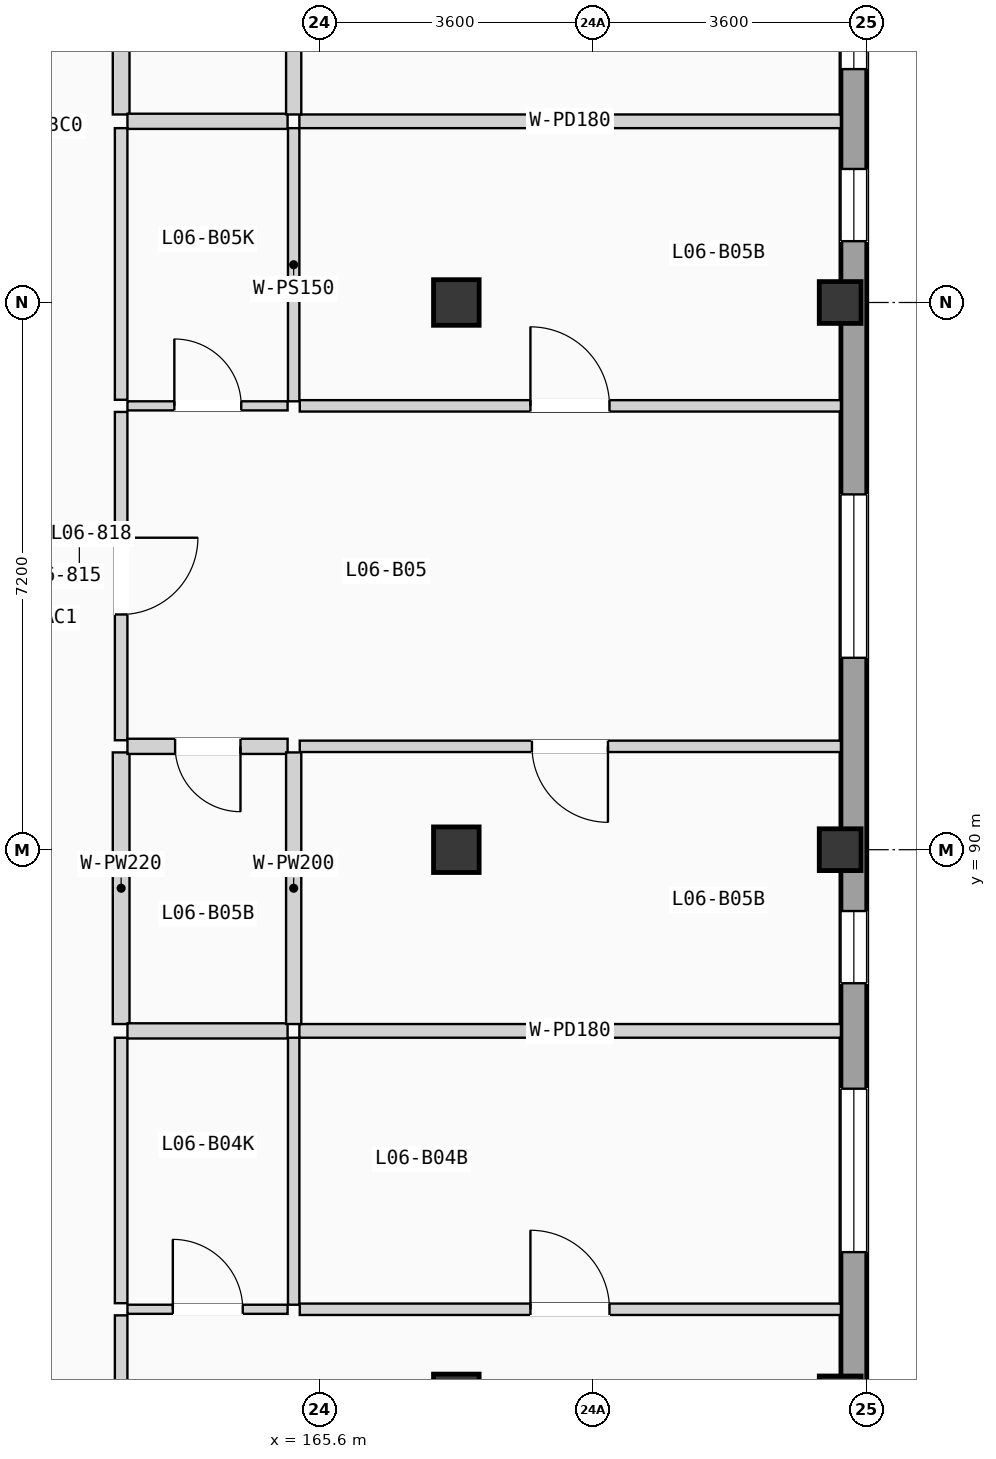
"""IFC4 building model, lengths in metres.
Left out: names, types, materials, properties, quantities, classifications, styles, units other than length and angle.
Written with IfcOpenShell. Run it as: python <this file> out.ifc"""

import sys

from ifc_helpers import new_model, si_unit, direction, frame, frame_2d, origin, origin_2d, place, context, subcontext, project, spatial, rectangle, extrude, element, fill, save


model = new_model("IFC4")
c1 = context("Model", 3, precision=1e-05, world=origin(), true_north=direction((0.0, 1.0)))
c2 = subcontext(c1, "Body", "Model", "MODEL_VIEW")
j1 = project(units=[si_unit("LENGTHUNIT", "METRE"), si_unit("PLANEANGLEUNIT", "RADIAN")], contexts=[c1])
p1 = place(None, origin())
s1 = spatial("IfcSite", under=j1, at=p1, CompositionType="ELEMENT")
p2 = place(p1, origin())
s2 = spatial("IfcBuilding", under=s1, at=p2, CompositionType="ELEMENT")
p3 = place(p2, frame((0.0, 0.0, 21.525)))
s3 = spatial("IfcBuildingStorey", under=s2, at=p3, CompositionType="ELEMENT", Elevation=21.525)
for number, where, z_axis, x_axis in (
    (1, (167.4, 82.8, 0.0), (0.0, 0.0, 1.0), (1.0, 0.0, 0.0)),
    (2, (167.4, 90.0, 0.0), (0.0, 0.0, 1.0), (1.0, 0.0, 0.0)),
    (3, (167.4, 97.2, 0.0), (0.0, 0.0, 1.0), (1.0, 0.0, 0.0)),
):
    element("IfcColumn", number, at=place(p3, frame(where, z_axis=z_axis, x_axis=x_axis)), inside=s3, PredefinedType="COLUMN", context=c2, shape_type="SweptSolid", body=[
        extrude(rectangle(XDim=0.6, YDim=0.6, at=origin_2d()), origin(), (0.0, 0.0, 1.0), 3.15),
    ])
for number, where, z_axis, x_axis in (
    (4, (172.45, 82.8, 0.0), (0.0, 0.0, 1.0), (1.0, 0.0, 0.0)),
    (5, (172.45, 90.0, 0.0), (0.0, 0.0, 1.0), (1.0, 0.0, 0.0)),
    (6, (172.45, 97.2, 0.0), (0.0, 0.0, 1.0), (1.0, 0.0, 0.0)),
):
    element("IfcColumn", number, at=place(p3, frame(where, z_axis=z_axis, x_axis=x_axis)), inside=s3, PredefinedType="COLUMN", context=c2, shape_type="SweptSolid", body=[
        extrude(rectangle(XDim=0.55, YDim=0.55, at=origin_2d()), origin(), (0.0, 0.0, 1.0), 3.15),
    ])
p4 = place(p3, frame((172.63, 68.74, 0.0), z_axis=(0.0, 0.0, 1.0), x_axis=(0.0, 1.0, 0.0)))
e7 = element("IfcWall", 7, at=p4, inside=s3, PredefinedType="SOLIDWALL", context=c2, shape_type="SweptSolid", body=[
    extrude(rectangle(XDim=49.72, YDim=0.34, at=frame_2d((24.86, 0.0))), origin(), (0.0, 0.0, 1.0), 2.89),
])
p5 = place(p4, frame((11.276, 0.0, 0.9)))
e8 = element("IfcOpeningElement", 8, at=p5, cuts=e7, PredefinedType="OPENING", context=c2, shape_type="SweptSolid", body=[
    extrude(rectangle(XDim=2.15, YDim=1.2, at=frame_2d((1.075, 0.6))), frame((0.0, 0.18, 0.0), z_axis=(0.0, -1.0, 0.0), x_axis=(1.0, 0.0, 0.0)), (0.0, 0.0, 1.0), 0.36),
])
p6 = place(p4, frame((7.931, 0.0, 0.855)))
e9 = element("IfcOpeningElement", 9, at=p6, cuts=e7, PredefinedType="OPENING", context=c2, shape_type="SweptSolid", body=[
    extrude(rectangle(XDim=2.15, YDim=1.35, at=frame_2d((1.075, 0.675))), frame((0.0, 0.18, 0.0), z_axis=(0.0, -1.0, 0.0), x_axis=(1.0, 0.0, 0.0)), (0.0, 0.0, 1.0), 0.36),
])
p7 = place(p4, frame((15.965, 0.0, 0.705)))
e10 = element("IfcOpeningElement", 10, at=p7, cuts=e7, PredefinedType="OPENING", context=c2, shape_type="SweptSolid", body=[
    extrude(rectangle(XDim=2.15, YDim=1.5, at=frame_2d((1.075, 0.75))), frame((0.0, 0.18, 0.0), z_axis=(0.0, -1.0, 0.0), x_axis=(1.0, 0.0, 0.0)), (0.0, 0.0, 1.0), 0.36),
])
p8 = place(p4, frame((23.785, 0.0, 0.555)))
e11 = element("IfcOpeningElement", 11, at=p8, cuts=e7, PredefinedType="OPENING", context=c2, shape_type="SweptSolid", body=[
    extrude(rectangle(XDim=2.15, YDim=1.65, at=frame_2d((1.075, 0.825))), frame((0.0, 0.18, 0.0), z_axis=(0.0, -1.0, 0.0), x_axis=(1.0, 0.0, 0.0)), (0.0, 0.0, 1.0), 0.36),
])
p9 = place(p4, frame((19.503, 0.0, 0.85)))
e12 = element("IfcOpeningElement", 12, at=p9, cuts=e7, PredefinedType="OPENING", context=c2, shape_type="SweptSolid", body=[
    extrude(rectangle(XDim=0.95, YDim=1.2, at=frame_2d((0.475, 0.6))), frame((0.0, 0.18, 0.0), z_axis=(0.0, -1.0, 0.0), x_axis=(1.0, 0.0, 0.0)), (0.0, 0.0, 1.0), 0.36),
])
p10 = place(p4, frame((29.267, 0.0, 0.85)))
e13 = element("IfcOpeningElement", 13, at=p10, cuts=e7, PredefinedType="OPENING", context=c2, shape_type="SweptSolid", body=[
    extrude(rectangle(XDim=0.95, YDim=1.2, at=frame_2d((0.475, 0.6))), frame((0.0, 0.18, 0.0), z_axis=(0.0, -1.0, 0.0), x_axis=(1.0, 0.0, 0.0)), (0.0, 0.0, 1.0), 0.36),
])
p11 = place(p4, frame((36.218, 0.0, 0.855)))
e14 = element("IfcOpeningElement", 14, at=p11, cuts=e7, PredefinedType="OPENING", context=c2, shape_type="SweptSolid", body=[
    extrude(rectangle(XDim=2.3, YDim=1.35, at=frame_2d((1.15, 0.675))), frame((0.0, 0.18, 0.0), z_axis=(0.0, -1.0, 0.0), x_axis=(1.0, 0.0, 0.0)), (0.0, 0.0, 1.0), 0.36),
])
p12 = place(p4, frame((31.531, 0.0, 0.705)))
e15 = element("IfcOpeningElement", 15, at=p12, cuts=e7, PredefinedType="OPENING", context=c2, shape_type="SweptSolid", body=[
    extrude(rectangle(XDim=2.3, YDim=1.5, at=frame_2d((1.15, 0.75))), frame((0.0, 0.18, 0.0), z_axis=(0.0, -1.0, 0.0), x_axis=(1.0, 0.0, 0.0)), (0.0, 0.0, 1.0), 0.36),
])
p13 = place(p4, frame((39.563, 0.0, 0.555)))
e16 = element("IfcOpeningElement", 16, at=p13, cuts=e7, PredefinedType="OPENING", context=c2, shape_type="SweptSolid", body=[
    extrude(rectangle(XDim=2.3, YDim=1.65, at=frame_2d((1.15, 0.825))), frame((0.0, 0.18, 0.0), z_axis=(0.0, -1.0, 0.0), x_axis=(1.0, 0.0, 0.0)), (0.0, 0.0, 1.0), 0.36),
])
p14 = place(p3, frame((162.99, 79.653, 0.0), z_axis=(0.0, 0.0, 1.0), x_axis=(0.0, 1.0, 0.0)))
e17 = element("IfcWall", 17, at=p14, inside=s3, PredefinedType="PARTITIONING", context=c2, shape_type="SweptSolid", body=[
    extrude(rectangle(XDim=4.22, YDim=0.165, at=frame_2d((2.11, 0.0))), origin(), (0.0, 0.0, 1.0), 2.87),
])
p15 = place(p14, frame((1.605, 0.0, 0.0)))
e18 = element("IfcOpeningElement", 18, at=p15, cuts=e17, PredefinedType="OPENING", context=c2, shape_type="SweptSolid", body=[
    extrude(rectangle(XDim=1.01, YDim=2.11, at=frame_2d((0.505, 1.055))), frame((0.0, 0.093, 0.0), z_axis=(0.0, -1.0, 0.0), x_axis=(1.0, 0.0, 0.0)), (0.0, 0.0, 1.0), 0.185),
])
p16 = place(p3, frame((162.99, 84.033, 0.0), z_axis=(0.0, 0.0, 1.0), x_axis=(0.0, 1.0, 0.0)))
e19 = element("IfcWall", 19, at=p16, inside=s3, PredefinedType="PARTITIONING", context=c2, shape_type="SweptSolid", body=[
    extrude(rectangle(XDim=3.493, YDim=0.165, at=frame_2d((1.747, 0.0))), origin(), (0.0, 0.0, 1.0), 2.87),
])
p17 = place(p3, frame((162.99, 91.44, 0.0), z_axis=(0.0, 0.0, 1.0), x_axis=(0.0, 1.0, 0.0)))
e20 = element("IfcWall", 20, at=p17, inside=s3, PredefinedType="PARTITIONING", context=c2, shape_type="SweptSolid", body=[
    extrude(rectangle(XDim=4.32, YDim=0.165, at=frame_2d((2.16, 0.0))), origin(), (0.0, 0.0, 1.0), 2.87),
])
p18 = place(p17, frame((1.655, 0.0, 0.0)))
e21 = element("IfcOpeningElement", 21, at=p18, cuts=e20, PredefinedType="OPENING", context=c2, shape_type="SweptSolid", body=[
    extrude(rectangle(XDim=1.01, YDim=2.11, at=frame_2d((0.505, 1.055))), frame((0.0, 0.093, 0.0), z_axis=(0.0, -1.0, 0.0), x_axis=(1.0, 0.0, 0.0)), (0.0, 0.0, 1.0), 0.185),
])
p19 = place(p3, frame((162.99, 87.706, 0.0), z_axis=(0.0, 0.0, 1.0), x_axis=(0.0, 1.0, 0.0)))
e22 = element("IfcWall", 22, at=p19, inside=s3, PredefinedType="PLUMBINGWALL", context=c2, shape_type="SweptSolid", body=[
    extrude(rectangle(XDim=3.574, YDim=0.22, at=frame_2d((1.787, 0.0))), origin(), (0.0, 0.0, 1.0), 2.87),
])
p20 = place(p3, frame((162.99, 95.92, 0.0), z_axis=(0.0, 0.0, 1.0), x_axis=(0.0, 1.0, 0.0)))
e23 = element("IfcWall", 23, at=p20, inside=s3, PredefinedType="PARTITIONING", context=c2, shape_type="SweptSolid", body=[
    extrude(rectangle(XDim=3.574, YDim=0.165, at=frame_2d((1.787, 0.0))), origin(), (0.0, 0.0, 1.0), 2.87),
])
p21 = place(p3, frame((162.99, 99.674, 0.0), z_axis=(0.0, 0.0, 1.0), x_axis=(0.0, 1.0, 0.0)))
e24 = element("IfcWall", 24, at=p21, inside=s3, PredefinedType="PLUMBINGWALL", context=c2, shape_type="SweptSolid", body=[
    extrude(rectangle(XDim=3.493, YDim=0.22, at=frame_2d((1.747, 0.0))), origin(), (0.0, 0.0, 1.0), 2.87),
])
p22 = place(p3, frame((163.073, 83.953, 0.0), z_axis=(0.0, 0.0, 1.0), x_axis=(1.0, 0.0, 0.0)))
e25 = element("IfcWall", 25, at=p22, inside=s3, PredefinedType="PARTITIONING", context=c2, shape_type="SweptSolid", body=[
    extrude(rectangle(XDim=2.107, YDim=0.12, at=frame_2d((1.053, 0.0))), origin(), (0.0, 0.0, 1.0), 2.87),
])
p23 = place(p22, frame((0.597, 0.0, 0.0)))
e26 = element("IfcOpeningElement", 26, at=p23, cuts=e25, PredefinedType="OPENING", context=c2, shape_type="SweptSolid", body=[
    extrude(rectangle(XDim=0.92, YDim=2.02, at=frame_2d((0.46, 1.01))), frame((0.0, 0.07, 0.0), z_axis=(0.0, -1.0, 0.0), x_axis=(1.0, 0.0, 0.0)), (0.0, 0.0, 1.0), 0.14),
])
p24 = place(p3, frame((165.34, 83.953, 0.0), z_axis=(0.0, 0.0, 1.0), x_axis=(1.0, 0.0, 0.0)))
e27 = element("IfcWall", 27, at=p24, inside=s3, PredefinedType="PARTITIONING", context=c2, shape_type="SweptSolid", body=[
    extrude(rectangle(XDim=7.12, YDim=0.15, at=frame_2d((3.56, 0.0))), origin(), (0.0, 0.0, 1.0), 2.87),
])
p25 = place(p24, frame((3.035, 0.0, 0.0)))
e28 = element("IfcOpeningElement", 28, at=p25, cuts=e27, PredefinedType="OPENING", context=c2, shape_type="SweptSolid", body=[
    extrude(rectangle(XDim=1.04, YDim=2.08, at=frame_2d((0.52, 1.04))), frame((0.0, 0.085, 0.0), z_axis=(0.0, -1.0, 0.0), x_axis=(1.0, 0.0, 0.0)), (0.0, 0.0, 1.0), 0.17),
])
p26 = place(p3, frame((165.26, 84.013, 0.0), z_axis=(0.0, 0.0, 1.0), x_axis=(0.0, 1.0, 0.0)))
e29 = element("IfcWall", 29, at=p26, inside=s3, PredefinedType="PARTITIONING", context=c2, shape_type="SweptSolid", body=[
    extrude(rectangle(XDim=3.513, YDim=0.15, at=frame_2d((1.756, 0.0))), origin(), (0.0, 0.0, 1.0), 2.87),
])
p27 = place(p3, frame((163.073, 87.616, 0.0), z_axis=(0.0, 0.0, 1.0), x_axis=(1.0, 0.0, 0.0)))
e30 = element("IfcWall", 30, at=p27, inside=s3, PredefinedType="PLUMBINGWALL", context=c2, shape_type="SweptSolid", body=[
    extrude(rectangle(XDim=2.107, YDim=0.2, at=frame_2d((1.053, 0.0))), origin(), (0.0, 0.0, 1.0), 2.87),
])
p28 = place(p3, frame((165.335, 87.616, 0.0), z_axis=(0.0, 0.0, 1.0), x_axis=(1.0, 0.0, 0.0)))
e31 = element("IfcWall", 31, at=p28, inside=s3, PredefinedType="PARTITIONING", context=c2, shape_type="SweptSolid", body=[
    extrude(rectangle(XDim=7.125, YDim=0.18, at=frame_2d((3.562, 0.0))), origin(), (0.0, 0.0, 1.0), 2.87),
])
p29 = place(p3, frame((163.073, 91.36, 0.0), z_axis=(0.0, 0.0, 1.0), x_axis=(1.0, 0.0, 0.0)))
e32 = element("IfcWall", 32, at=p29, inside=s3, PredefinedType="PLUMBINGWALL", context=c2, shape_type="SweptSolid", body=[
    extrude(rectangle(XDim=2.107, YDim=0.2, at=frame_2d((1.053, 0.0))), origin(), (0.0, 0.0, 1.0), 2.87),
])
p30 = place(p29, frame((0.627, 0.0, 0.0)))
e33 = element("IfcOpeningElement", 33, at=p30, cuts=e32, PredefinedType="OPENING", context=c2, shape_type="SweptSolid", body=[
    extrude(rectangle(XDim=0.86, YDim=2.0, at=frame_2d((0.43, 1.0))), frame((0.0, 0.11, 0.0), z_axis=(0.0, -1.0, 0.0), x_axis=(1.0, 0.0, 0.0)), (0.0, 0.0, 1.0), 0.22),
])
p31 = place(p3, frame((163.073, 95.84, 0.0), z_axis=(0.0, 0.0, 1.0), x_axis=(1.0, 0.0, 0.0)))
e34 = element("IfcWall", 34, at=p31, inside=s3, PredefinedType="PARTITIONING", context=c2, shape_type="SweptSolid", body=[
    extrude(rectangle(XDim=2.107, YDim=0.12, at=frame_2d((1.053, 0.0))), origin(), (0.0, 0.0, 1.0), 2.87),
])
p32 = place(p31, frame((0.617, 0.0, 0.0)))
e35 = element("IfcOpeningElement", 35, at=p32, cuts=e34, PredefinedType="OPENING", context=c2, shape_type="SweptSolid", body=[
    extrude(rectangle(XDim=0.88, YDim=2.02, at=frame_2d((0.44, 1.01))), frame((0.0, 0.07, 0.0), z_axis=(0.0, -1.0, 0.0), x_axis=(1.0, 0.0, 0.0)), (0.0, 0.0, 1.0), 0.14),
])
p33 = place(p3, frame((165.34, 91.36, 0.0), z_axis=(0.0, 0.0, 1.0), x_axis=(1.0, 0.0, 0.0)))
e36 = element("IfcWall", 36, at=p33, inside=s3, PredefinedType="PARTITIONING", context=c2, shape_type="SweptSolid", body=[
    extrude(rectangle(XDim=7.12, YDim=0.15, at=frame_2d((3.56, 0.0))), origin(), (0.0, 0.0, 1.0), 2.87),
])
p34 = place(p33, frame((3.055, 0.0, 0.0)))
e37 = element("IfcOpeningElement", 37, at=p34, cuts=e36, PredefinedType="OPENING", context=c2, shape_type="SweptSolid", body=[
    extrude(rectangle(XDim=1.0, YDim=2.06, at=frame_2d((0.5, 1.03))), frame((0.0, 0.085, 0.0), z_axis=(0.0, -1.0, 0.0), x_axis=(1.0, 0.0, 0.0)), (0.0, 0.0, 1.0), 0.17),
])
p35 = place(p3, frame((165.34, 95.84, 0.0), z_axis=(0.0, 0.0, 1.0), x_axis=(1.0, 0.0, 0.0)))
e38 = element("IfcWall", 38, at=p35, inside=s3, PredefinedType="PARTITIONING", context=c2, shape_type="SweptSolid", body=[
    extrude(rectangle(XDim=7.12, YDim=0.15, at=frame_2d((3.56, 0.0))), origin(), (0.0, 0.0, 1.0), 2.87),
])
p36 = place(p35, frame((3.035, 0.0, 0.0)))
e39 = element("IfcOpeningElement", 39, at=p36, cuts=e38, PredefinedType="OPENING", context=c2, shape_type="SweptSolid", body=[
    extrude(rectangle(XDim=1.04, YDim=2.08, at=frame_2d((0.52, 1.04))), frame((0.0, 0.085, 0.0), z_axis=(0.0, -1.0, 0.0), x_axis=(1.0, 0.0, 0.0)), (0.0, 0.0, 1.0), 0.17),
])
p37 = place(p3, frame((165.26, 87.706, 0.0), z_axis=(0.0, 0.0, 1.0), x_axis=(0.0, 1.0, 0.0)))
e40 = element("IfcWall", 40, at=p37, inside=s3, PredefinedType="PLUMBINGWALL", context=c2, shape_type="SweptSolid", body=[
    extrude(rectangle(XDim=3.574, YDim=0.2, at=frame_2d((1.787, 0.0))), origin(), (0.0, 0.0, 1.0), 2.87),
])
p38 = place(p3, frame((165.26, 95.9, 0.0), z_axis=(0.0, 0.0, 1.0), x_axis=(0.0, 1.0, 0.0)))
e41 = element("IfcWall", 41, at=p38, inside=s3, PredefinedType="PARTITIONING", context=c2, shape_type="SweptSolid", body=[
    extrude(rectangle(XDim=3.594, YDim=0.15, at=frame_2d((1.797, 0.0))), origin(), (0.0, 0.0, 1.0), 2.87),
])
p39 = place(p3, frame((163.073, 99.584, 0.0), z_axis=(0.0, 0.0, 1.0), x_axis=(1.0, 0.0, 0.0)))
e42 = element("IfcWall", 42, at=p39, inside=s3, PredefinedType="PLUMBINGWALL", context=c2, shape_type="SweptSolid", body=[
    extrude(rectangle(XDim=2.107, YDim=0.2, at=frame_2d((1.053, 0.0))), origin(), (0.0, 0.0, 1.0), 2.87),
])
p40 = place(p3, frame((165.335, 99.584, 0.0), z_axis=(0.0, 0.0, 1.0), x_axis=(1.0, 0.0, 0.0)))
e43 = element("IfcWall", 43, at=p40, inside=s3, PredefinedType="PARTITIONING", context=c2, shape_type="SweptSolid", body=[
    extrude(rectangle(XDim=7.125, YDim=0.18, at=frame_2d((3.562, 0.0))), origin(), (0.0, 0.0, 1.0), 2.87),
])
p41 = place(p3, frame((165.26, 99.674, 0.0), z_axis=(0.0, 0.0, 1.0), x_axis=(0.0, 1.0, 0.0)))
e44 = element("IfcWall", 44, at=p41, inside=s3, PredefinedType="PLUMBINGWALL", context=c2, shape_type="SweptSolid", body=[
    extrude(rectangle(XDim=3.493, YDim=0.2, at=frame_2d((1.747, 0.0))), origin(), (0.0, 0.0, 1.0), 2.87),
])
p42 = place(p7, origin())
e45 = element("IfcWindow", 45, at=p42, inside=s3, PartitioningType="DOUBLE_PANEL_VERTICAL", PredefinedType="WINDOW", context=c2, shape_type="SweptSolid", body=[
    extrude(rectangle(XDim=2.15, YDim=1.5, at=frame_2d((1.075, 0.75))), frame((0.0, 0.03, 0.0), z_axis=(0.0, -1.0, 0.0), x_axis=(1.0, 0.0, 0.0)), (0.0, 0.0, 1.0), 0.06),
])
fill(e10, e45)
p43 = place(p8, origin())
e46 = element("IfcWindow", 46, at=p43, inside=s3, PartitioningType="DOUBLE_PANEL_VERTICAL", PredefinedType="WINDOW", context=c2, shape_type="SweptSolid", body=[
    extrude(rectangle(XDim=2.15, YDim=1.65, at=frame_2d((1.075, 0.825))), frame((0.0, 0.03, 0.0), z_axis=(0.0, -1.0, 0.0), x_axis=(1.0, 0.0, 0.0)), (0.0, 0.0, 1.0), 0.06),
])
fill(e11, e46)
p44 = place(p9, origin())
e47 = element("IfcWindow", 47, at=p44, inside=s3, PartitioningType="SINGLE_PANEL", PredefinedType="WINDOW", context=c2, shape_type="SweptSolid", body=[
    extrude(rectangle(XDim=0.95, YDim=1.2, at=frame_2d((0.475, 0.6))), frame((0.0, 0.03, 0.0), z_axis=(0.0, -1.0, 0.0), x_axis=(1.0, 0.0, 0.0)), (0.0, 0.0, 1.0), 0.06),
])
fill(e12, e47)
p45 = place(p10, origin())
e48 = element("IfcWindow", 48, at=p45, inside=s3, PartitioningType="SINGLE_PANEL", PredefinedType="WINDOW", context=c2, shape_type="SweptSolid", body=[
    extrude(rectangle(XDim=0.95, YDim=1.2, at=frame_2d((0.475, 0.6))), frame((0.0, 0.03, 0.0), z_axis=(0.0, -1.0, 0.0), x_axis=(1.0, 0.0, 0.0)), (0.0, 0.0, 1.0), 0.06),
])
fill(e13, e48)
p46 = place(p12, origin())
e49 = element("IfcWindow", 49, at=p46, inside=s3, PartitioningType="DOUBLE_PANEL_VERTICAL", PredefinedType="WINDOW", context=c2, shape_type="SweptSolid", body=[
    extrude(rectangle(XDim=2.3, YDim=1.5, at=frame_2d((1.15, 0.75))), frame((0.0, 0.03, 0.0), z_axis=(0.0, -1.0, 0.0), x_axis=(1.0, 0.0, 0.0)), (0.0, 0.0, 1.0), 0.06),
])
fill(e15, e49)
p47 = place(p18, frame((1.01, 0.0, 0.0), z_axis=(0.0, 0.0, 1.0), x_axis=(-1.0, 0.0, 0.0)))
e50 = element("IfcDoor", 50, at=p47, inside=s3, OperationType="SINGLE_SWING_RIGHT", PredefinedType="DOOR", context=c2, shape_type="SweptSolid", body=[
    extrude(rectangle(XDim=1.01, YDim=2.11, at=frame_2d((0.505, 1.055))), frame((0.0, 0.025, 0.0), z_axis=(0.0, -1.0, 0.0), x_axis=(1.0, 0.0, 0.0)), (0.0, 0.0, 1.0), 0.05),
])
fill(e21, e50)
p48 = place(p23, origin())
e51 = element("IfcDoor", 51, at=p48, inside=s3, OperationType="SINGLE_SWING_LEFT", PredefinedType="DOOR", context=c2, shape_type="SweptSolid", body=[
    extrude(rectangle(XDim=0.92, YDim=2.02, at=frame_2d((0.46, 1.01))), frame((0.0, 0.025, 0.0), z_axis=(0.0, -1.0, 0.0), x_axis=(1.0, 0.0, 0.0)), (0.0, 0.0, 1.0), 0.05),
])
fill(e26, e51)
p49 = place(p25, origin())
e52 = element("IfcDoor", 52, at=p49, inside=s3, OperationType="SINGLE_SWING_LEFT", PredefinedType="DOOR", context=c2, shape_type="SweptSolid", body=[
    extrude(rectangle(XDim=1.04, YDim=2.08, at=frame_2d((0.52, 1.04))), frame((0.0, 0.025, 0.0), z_axis=(0.0, -1.0, 0.0), x_axis=(1.0, 0.0, 0.0)), (0.0, 0.0, 1.0), 0.05),
])
fill(e28, e52)
p50 = place(p30, frame((0.86, 0.0, 0.0), z_axis=(0.0, 0.0, 1.0), x_axis=(-1.0, 0.0, 0.0)))
e53 = element("IfcDoor", 53, at=p50, inside=s3, OperationType="SINGLE_SWING_RIGHT", PredefinedType="DOOR", context=c2, shape_type="SweptSolid", body=[
    extrude(rectangle(XDim=0.86, YDim=2.0, at=frame_2d((0.43, 1.0))), frame((0.0, 0.025, 0.0), z_axis=(0.0, -1.0, 0.0), x_axis=(1.0, 0.0, 0.0)), (0.0, 0.0, 1.0), 0.05),
])
fill(e33, e53)
p51 = place(p32, origin())
e54 = element("IfcDoor", 54, at=p51, inside=s3, OperationType="SINGLE_SWING_LEFT", PredefinedType="DOOR", context=c2, shape_type="SweptSolid", body=[
    extrude(rectangle(XDim=0.88, YDim=2.02, at=frame_2d((0.44, 1.01))), frame((0.0, 0.025, 0.0), z_axis=(0.0, -1.0, 0.0), x_axis=(1.0, 0.0, 0.0)), (0.0, 0.0, 1.0), 0.05),
])
fill(e35, e54)
p52 = place(p34, frame((1.0, 0.0, 0.0), z_axis=(0.0, 0.0, 1.0), x_axis=(-1.0, 0.0, 0.0)))
e55 = element("IfcDoor", 55, at=p52, inside=s3, OperationType="SINGLE_SWING_RIGHT", PredefinedType="DOOR", context=c2, shape_type="SweptSolid", body=[
    extrude(rectangle(XDim=1.0, YDim=2.06, at=frame_2d((0.5, 1.03))), frame((0.0, 0.025, 0.0), z_axis=(0.0, -1.0, 0.0), x_axis=(1.0, 0.0, 0.0)), (0.0, 0.0, 1.0), 0.05),
])
fill(e37, e55)
p53 = place(p36, origin())
e56 = element("IfcDoor", 56, at=p53, inside=s3, OperationType="SINGLE_SWING_LEFT", PredefinedType="DOOR", context=c2, shape_type="SweptSolid", body=[
    extrude(rectangle(XDim=1.04, YDim=2.08, at=frame_2d((0.52, 1.04))), frame((0.0, 0.025, 0.0), z_axis=(0.0, -1.0, 0.0), x_axis=(1.0, 0.0, 0.0)), (0.0, 0.0, 1.0), 0.05),
])
fill(e39, e56)
save(model, sys.argv[1])
